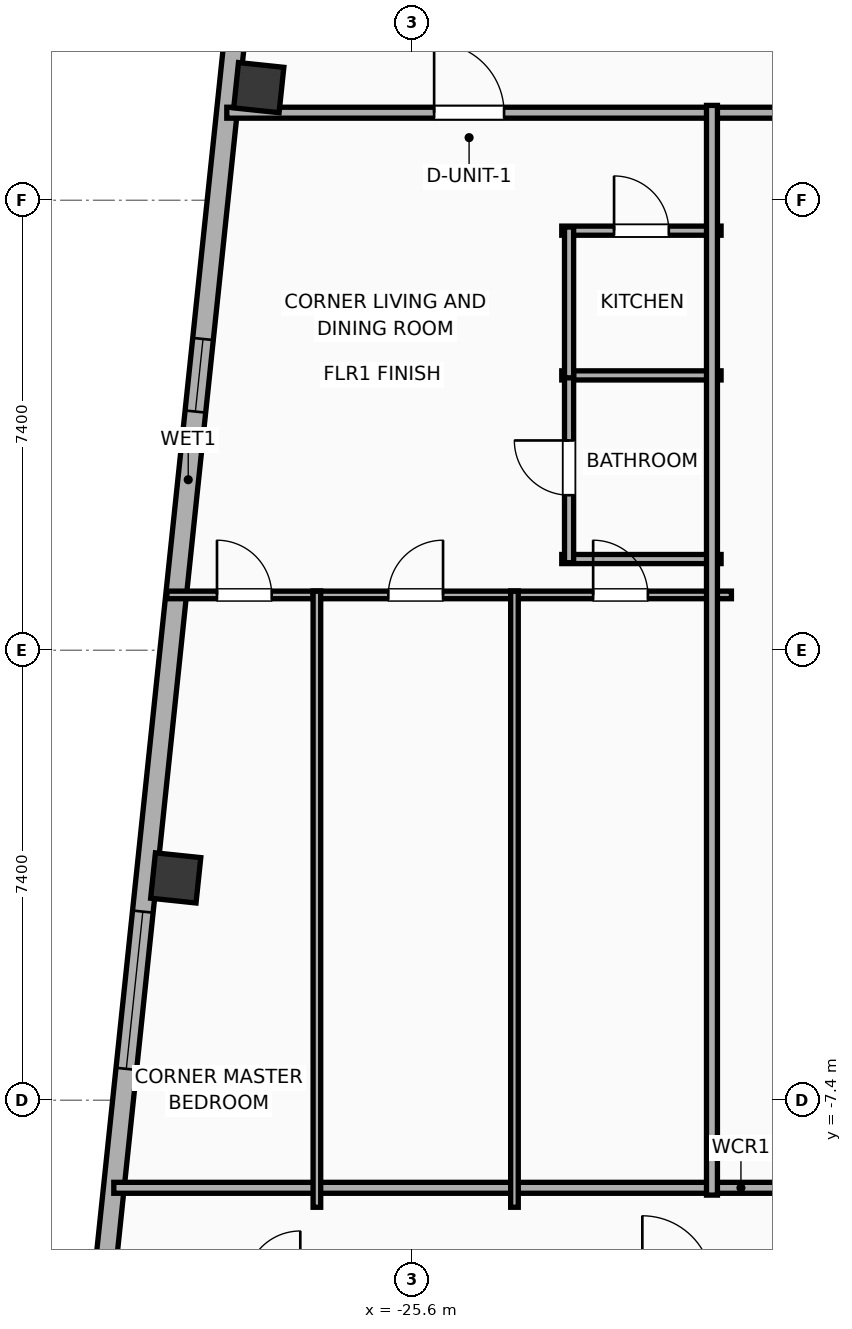
"""IFC4 building model, lengths in metres.
Left out: names, types, materials, properties, quantities, classifications, styles, units other than length and angle.
Written with IfcOpenShell. Run it as: python <this file> out.ifc"""

import sys

from ifc_helpers import new_model, si_unit, direction, frame, frame_2d, origin, origin_2d, place, context, subcontext, project, spatial, rectangle, hollow_rectangle, extrude, element, fill, save


model = new_model("IFC4")
c1 = context("Model", 3, precision=1e-05, world=origin(), true_north=direction((0.0, 1.0)))
c2 = subcontext(c1, "Body", "Model", "MODEL_VIEW")
j1 = project(units=[si_unit("LENGTHUNIT", "METRE"), si_unit("PLANEANGLEUNIT", "RADIAN")], contexts=[c1])
p1 = place(None, origin())
s1 = spatial("IfcSite", under=j1, at=p1, CompositionType="ELEMENT")
p2 = place(p1, origin())
s2 = spatial("IfcBuilding", under=s1, at=p2, CompositionType="ELEMENT")
p3 = place(p2, frame((0.0, 0.0, 302.9)))
s3 = spatial("IfcBuildingStorey", under=s2, at=p3, CompositionType="ELEMENT", Elevation=302.9)
for number, where, z_axis, x_axis in (
    (1, (-28.123, 9.252, 0.0), (0.0, 0.0, 1.0), (0.995, -0.105, 0.0)),
    (2, (-29.489, -3.744, 0.0), (0.0, 0.0, 1.0), (0.995, -0.105, 0.0)),
):
    element("IfcColumn", number, at=place(p3, frame(where, z_axis=z_axis, x_axis=x_axis)), inside=s3, PredefinedType="COLUMN", context=c2, shape_type="SweptSolid", body=[
        extrude(hollow_rectangle(XDim=0.75, YDim=0.75, WallThickness=0.025, at=origin_2d()), origin(), (0.0, 0.0, 1.0), 3.9),
    ])
p4 = place(p3, frame((-30.87, -12.296, 0.0), z_axis=(0.0, 0.0, 1.0), x_axis=(0.104533282919, 0.994521388791, 0.0)))
e3 = element("IfcWall", 3, at=p4, inside=s3, PredefinedType="ELEMENTEDWALL", context=c2, shape_type="SweptSolid", body=[
    extrude(rectangle(XDim=30.366, YDim=0.34, at=frame_2d((15.183, 0.0))), origin(), (0.0, 0.0, 1.0), 3.635),
])
p5 = place(p4, frame((5.442, 0.0, 0.65)))
e4 = element("IfcOpeningElement", 4, at=p5, cuts=e3, PredefinedType="OPENING", context=c2, shape_type="SweptSolid", body=[
    extrude(rectangle(XDim=2.6, YDim=2.45, at=frame_2d((1.3, 1.225))), frame((0.0, 0.18, 0.0), z_axis=(0.0, -1.0, 0.0), x_axis=(1.0, 0.0, 0.0)), (0.0, 0.0, 1.0), 0.36),
])
p6 = place(p4, frame((26.861, 0.0, 0.75)))
e5 = element("IfcOpeningElement", 5, at=p6, cuts=e3, PredefinedType="OPENING", context=c2, shape_type="SweptSolid", body=[
    extrude(rectangle(XDim=1.2, YDim=2.05, at=frame_2d((0.6, 1.025))), frame((0.0, 0.18, 0.0), z_axis=(0.0, -1.0, 0.0), x_axis=(1.0, 0.0, 0.0)), (0.0, 0.0, 1.0), 0.36),
])
p7 = place(p4, frame((16.311, 0.0, 0.75)))
e6 = element("IfcOpeningElement", 6, at=p7, cuts=e3, PredefinedType="OPENING", context=c2, shape_type="SweptSolid", body=[
    extrude(rectangle(XDim=1.2, YDim=2.05, at=frame_2d((0.6, 1.025))), frame((0.0, 0.18, 0.0), z_axis=(0.0, -1.0, 0.0), x_axis=(1.0, 0.0, 0.0)), (0.0, 0.0, 1.0), 0.36),
])
p8 = place(p3, frame((-28.649, 8.84, 0.0), z_axis=(0.0, 0.0, 1.0), x_axis=(1.0, 0.0, 0.0)))
e7 = element("IfcWall", 7, at=p8, inside=s3, PredefinedType="PARTITIONING", context=c2, shape_type="SweptSolid", body=[
    extrude(rectangle(XDim=18.769, YDim=0.18, at=frame_2d((9.384, 0.0))), origin(), (0.0, 0.0, 1.0), 3.075),
])
p9 = place(p8, frame((3.41, 0.0, 0.0)))
e8 = element("IfcOpeningElement", 8, at=p9, cuts=e7, PredefinedType="OPENING", context=c2, shape_type="SweptSolid", body=[
    extrude(rectangle(XDim=1.15, YDim=2.05, at=frame_2d((0.575, 1.025))), frame((0.0, 0.1, 0.0), z_axis=(0.0, -1.0, 0.0), x_axis=(1.0, 0.0, 0.0)), (0.0, 0.0, 1.0), 0.2),
])
p10 = place(p3, frame((-30.507, -8.84, 0.0), z_axis=(0.0, 0.0, 1.0), x_axis=(1.0, 0.0, 0.0)))
e9 = element("IfcWall", 9, at=p10, inside=s3, PredefinedType="PARTITIONING", context=c2, shape_type="SweptSolid", body=[
    extrude(rectangle(XDim=20.627, YDim=0.18, at=frame_2d((10.313, 0.0))), origin(), (0.0, 0.0, 1.0), 3.635),
])
p11 = place(p3, frame((-23.14, 6.9, 0.0), z_axis=(0.0, 0.0, 1.0), x_axis=(1.0, 0.0, 0.0)))
e10 = element("IfcWall", 10, at=p11, inside=s3, PredefinedType="PLUMBINGWALL", context=c2, shape_type="SweptSolid", body=[
    extrude(rectangle(XDim=2.62, YDim=0.15, at=frame_2d((1.31, 0.0))), origin(), (0.0, 0.0, 1.0), 3.635),
])
p12 = place(p11, frame((0.86, 0.0, 0.0)))
e11 = element("IfcOpeningElement", 11, at=p12, cuts=e10, PredefinedType="OPENING", context=c2, shape_type="SweptSolid", body=[
    extrude(rectangle(XDim=0.9, YDim=2.05, at=frame_2d((0.45, 1.025))), frame((0.0, 0.085, 0.0), z_axis=(0.0, -1.0, 0.0), x_axis=(1.0, 0.0, 0.0)), (0.0, 0.0, 1.0), 0.17),
])
for number, where, z_axis, x_axis in (
    (12, (-23.14, 4.52, 0.0), (0.0, 0.0, 1.0), (1.0, 0.0, 0.0)),
    (13, (-23.14, 1.5, 0.0), (0.0, 0.0, 1.0), (1.0, 0.0, 0.0)),
):
    element("IfcWall", number, at=place(p3, frame(where, z_axis=z_axis, x_axis=x_axis)), inside=s3, PredefinedType="PLUMBINGWALL", context=c2, shape_type="SweptSolid", body=[
        extrude(rectangle(XDim=2.62, YDim=0.15, at=frame_2d((1.31, 0.0))), origin(), (0.0, 0.0, 1.0), 3.635),
    ])
p13 = place(p3, frame((-23.02, 1.44, 0.0), z_axis=(0.0, 0.0, 1.0), x_axis=(0.0, 1.0, 0.0)))
e14 = element("IfcWall", 14, at=p13, inside=s3, PredefinedType="PLUMBINGWALL", context=c2, shape_type="SweptSolid", body=[
    extrude(rectangle(XDim=3.12, YDim=0.15, at=frame_2d((1.56, 0.0))), origin(), (0.0, 0.0, 1.0), 3.635),
])
p14 = place(p13, frame((1.11, 0.0, 0.0)))
e15 = element("IfcOpeningElement", 15, at=p14, cuts=e14, PredefinedType="OPENING", context=c2, shape_type="SweptSolid", body=[
    extrude(rectangle(XDim=0.9, YDim=2.05, at=frame_2d((0.45, 1.025))), frame((0.0, 0.085, 0.0), z_axis=(0.0, -1.0, 0.0), x_axis=(1.0, 0.0, 0.0)), (0.0, 0.0, 1.0), 0.17),
])
p15 = place(p3, frame((-23.02, 4.48, 0.0), z_axis=(0.0, 0.0, 1.0), x_axis=(0.0, 1.0, 0.0)))
e16 = element("IfcWall", 16, at=p15, inside=s3, PredefinedType="PLUMBINGWALL", context=c2, shape_type="SweptSolid", body=[
    extrude(rectangle(XDim=2.48, YDim=0.15, at=frame_2d((1.24, 0.0))), origin(), (0.0, 0.0, 1.0), 3.635),
])
p16 = place(p3, frame((-29.633, 0.91, 0.0), z_axis=(0.0, 0.0, 1.0), x_axis=(1.0, 0.0, 0.0)))
e17 = element("IfcWall", 17, at=p16, inside=s3, PredefinedType="PARTITIONING", context=c2, shape_type="SweptSolid", body=[
    extrude(rectangle(XDim=2.529, YDim=0.125, at=frame_2d((1.264, 0.0))), origin(), (0.0, 0.0, 1.0), 3.635),
])
p17 = place(p16, frame((0.823, 0.0, 0.0)))
e18 = element("IfcOpeningElement", 18, at=p17, cuts=e17, PredefinedType="OPENING", context=c2, shape_type="SweptSolid", body=[
    extrude(rectangle(XDim=0.9, YDim=2.05, at=frame_2d((0.45, 1.025))), frame((0.0, 0.073, 0.0), z_axis=(0.0, -1.0, 0.0), x_axis=(1.0, 0.0, 0.0)), (0.0, 0.0, 1.0), 0.145),
])
p18 = place(p3, frame((-27.229, 0.91, 0.0), z_axis=(0.0, 0.0, 1.0), x_axis=(1.0, 0.0, 0.0)))
e19 = element("IfcWall", 19, at=p18, inside=s3, PredefinedType="PARTITIONING", context=c2, shape_type="SweptSolid", body=[
    extrude(rectangle(XDim=3.374, YDim=0.125, at=frame_2d((1.687, 0.0))), origin(), (0.0, 0.0, 1.0), 3.635),
])
p19 = place(p18, frame((1.237, 0.0, 0.0)))
e20 = element("IfcOpeningElement", 20, at=p19, cuts=e19, PredefinedType="OPENING", context=c2, shape_type="SweptSolid", body=[
    extrude(rectangle(XDim=0.9, YDim=2.05, at=frame_2d((0.45, 1.025))), frame((0.0, 0.073, 0.0), z_axis=(0.0, -1.0, 0.0), x_axis=(1.0, 0.0, 0.0)), (0.0, 0.0, 1.0), 0.145),
])
p20 = place(p3, frame((-23.98, 0.91, 0.0), z_axis=(0.0, 0.0, 1.0), x_axis=(1.0, 0.0, 0.0)))
e21 = element("IfcWall", 21, at=p20, inside=s3, PredefinedType="PARTITIONING", context=c2, shape_type="SweptSolid", body=[
    extrude(rectangle(XDim=3.63, YDim=0.125, at=frame_2d((1.815, 0.0))), origin(), (0.0, 0.0, 1.0), 3.635),
])
p21 = place(p20, frame((1.356, 0.0, 0.0)))
e22 = element("IfcOpeningElement", 22, at=p21, cuts=e21, PredefinedType="OPENING", context=c2, shape_type="SweptSolid", body=[
    extrude(rectangle(XDim=0.9, YDim=2.05, at=frame_2d((0.45, 1.025))), frame((0.0, 0.073, 0.0), z_axis=(0.0, -1.0, 0.0), x_axis=(1.0, 0.0, 0.0)), (0.0, 0.0, 1.0), 0.145),
])
for number, where, z_axis, x_axis in (
    (23, (-23.918, -9.16, 0.0), (0.0, 0.0, 1.0), (0.0, 1.0, 0.0)),
    (24, (-27.167, -9.16, 0.0), (0.0, 0.0, 1.0), (0.0, 1.0, 0.0)),
):
    element("IfcWall", number, at=place(p3, frame(where, z_axis=z_axis, x_axis=x_axis)), inside=s3, PredefinedType="PARTITIONING", context=c2, shape_type="SweptSolid", body=[
        extrude(rectangle(XDim=10.13, YDim=0.125, at=frame_2d((5.065, 0.0))), origin(), (0.0, 0.0, 1.0), 3.635),
    ])
p22 = place(p3, frame((-20.67, -8.96, 0.0), z_axis=(0.0, 0.0, 1.0), x_axis=(0.0, 1.0, 0.0)))
e25 = element("IfcWall", 25, at=p22, inside=s3, PredefinedType="PARTITIONING", context=c2, shape_type="SweptSolid", body=[
    extrude(rectangle(XDim=17.92, YDim=0.18, at=frame_2d((8.96, 0.0))), origin(), (0.0, 0.0, 1.0), 3.635),
])
p23 = place(p5, origin())
e26 = element("IfcWindow", 26, at=p23, inside=s3, PartitioningType="SINGLE_PANEL", PredefinedType="WINDOW", context=c2, shape_type="SweptSolid", body=[
    extrude(rectangle(XDim=2.6, YDim=2.45, at=frame_2d((1.3, 1.225))), frame((0.0, 0.03, 0.0), z_axis=(0.0, -1.0, 0.0), x_axis=(1.0, 0.0, 0.0)), (0.0, 0.0, 1.0), 0.06),
])
fill(e4, e26)
p24 = place(p7, origin())
e27 = element("IfcWindow", 27, at=p24, inside=s3, PartitioningType="SINGLE_PANEL", PredefinedType="WINDOW", context=c2, shape_type="SweptSolid", body=[
    extrude(rectangle(XDim=1.2, YDim=2.05, at=frame_2d((0.6, 1.025))), frame((0.0, 0.03, 0.0), z_axis=(0.0, -1.0, 0.0), x_axis=(1.0, 0.0, 0.0)), (0.0, 0.0, 1.0), 0.06),
])
fill(e6, e27)
p25 = place(p9, origin())
e28 = element("IfcDoor", 28, at=p25, inside=s3, OperationType="SINGLE_SWING_LEFT", PredefinedType="DOOR", context=c2, shape_type="SweptSolid", body=[
    extrude(rectangle(XDim=1.15, YDim=2.05, at=frame_2d((0.575, 1.025))), frame((0.0, 0.025, 0.0), z_axis=(0.0, -1.0, 0.0), x_axis=(1.0, 0.0, 0.0)), (0.0, 0.0, 1.0), 0.05),
])
fill(e8, e28)
p26 = place(p12, origin())
e29 = element("IfcDoor", 29, at=p26, inside=s3, OperationType="SINGLE_SWING_LEFT", PredefinedType="DOOR", context=c2, shape_type="SweptSolid", body=[
    extrude(rectangle(XDim=0.9, YDim=2.05, at=frame_2d((0.45, 1.025))), frame((0.0, 0.025, 0.0), z_axis=(0.0, -1.0, 0.0), x_axis=(1.0, 0.0, 0.0)), (0.0, 0.0, 1.0), 0.05),
])
fill(e11, e29)
p27 = place(p14, origin())
e30 = element("IfcDoor", 30, at=p27, inside=s3, OperationType="SINGLE_SWING_RIGHT", PredefinedType="DOOR", context=c2, shape_type="SweptSolid", body=[
    extrude(rectangle(XDim=0.9, YDim=2.05, at=frame_2d((0.45, 1.025))), frame((0.0, 0.025, 0.0), z_axis=(0.0, -1.0, 0.0), x_axis=(1.0, 0.0, 0.0)), (0.0, 0.0, 1.0), 0.05),
])
fill(e15, e30)
p28 = place(p17, origin())
e31 = element("IfcDoor", 31, at=p28, inside=s3, OperationType="SINGLE_SWING_LEFT", PredefinedType="DOOR", context=c2, shape_type="SweptSolid", body=[
    extrude(rectangle(XDim=0.9, YDim=2.05, at=frame_2d((0.45, 1.025))), frame((0.0, 0.025, 0.0), z_axis=(0.0, -1.0, 0.0), x_axis=(1.0, 0.0, 0.0)), (0.0, 0.0, 1.0), 0.05),
])
fill(e18, e31)
p29 = place(p19, origin())
e32 = element("IfcDoor", 32, at=p29, inside=s3, OperationType="SINGLE_SWING_RIGHT", PredefinedType="DOOR", context=c2, shape_type="SweptSolid", body=[
    extrude(rectangle(XDim=0.9, YDim=2.05, at=frame_2d((0.45, 1.025))), frame((0.0, 0.025, 0.0), z_axis=(0.0, -1.0, 0.0), x_axis=(1.0, 0.0, 0.0)), (0.0, 0.0, 1.0), 0.05),
])
fill(e20, e32)
p30 = place(p21, origin())
e33 = element("IfcDoor", 33, at=p30, inside=s3, OperationType="SINGLE_SWING_LEFT", PredefinedType="DOOR", context=c2, shape_type="SweptSolid", body=[
    extrude(rectangle(XDim=0.9, YDim=2.05, at=frame_2d((0.45, 1.025))), frame((0.0, 0.025, 0.0), z_axis=(0.0, -1.0, 0.0), x_axis=(1.0, 0.0, 0.0)), (0.0, 0.0, 1.0), 0.05),
])
fill(e22, e33)
save(model, sys.argv[1])
